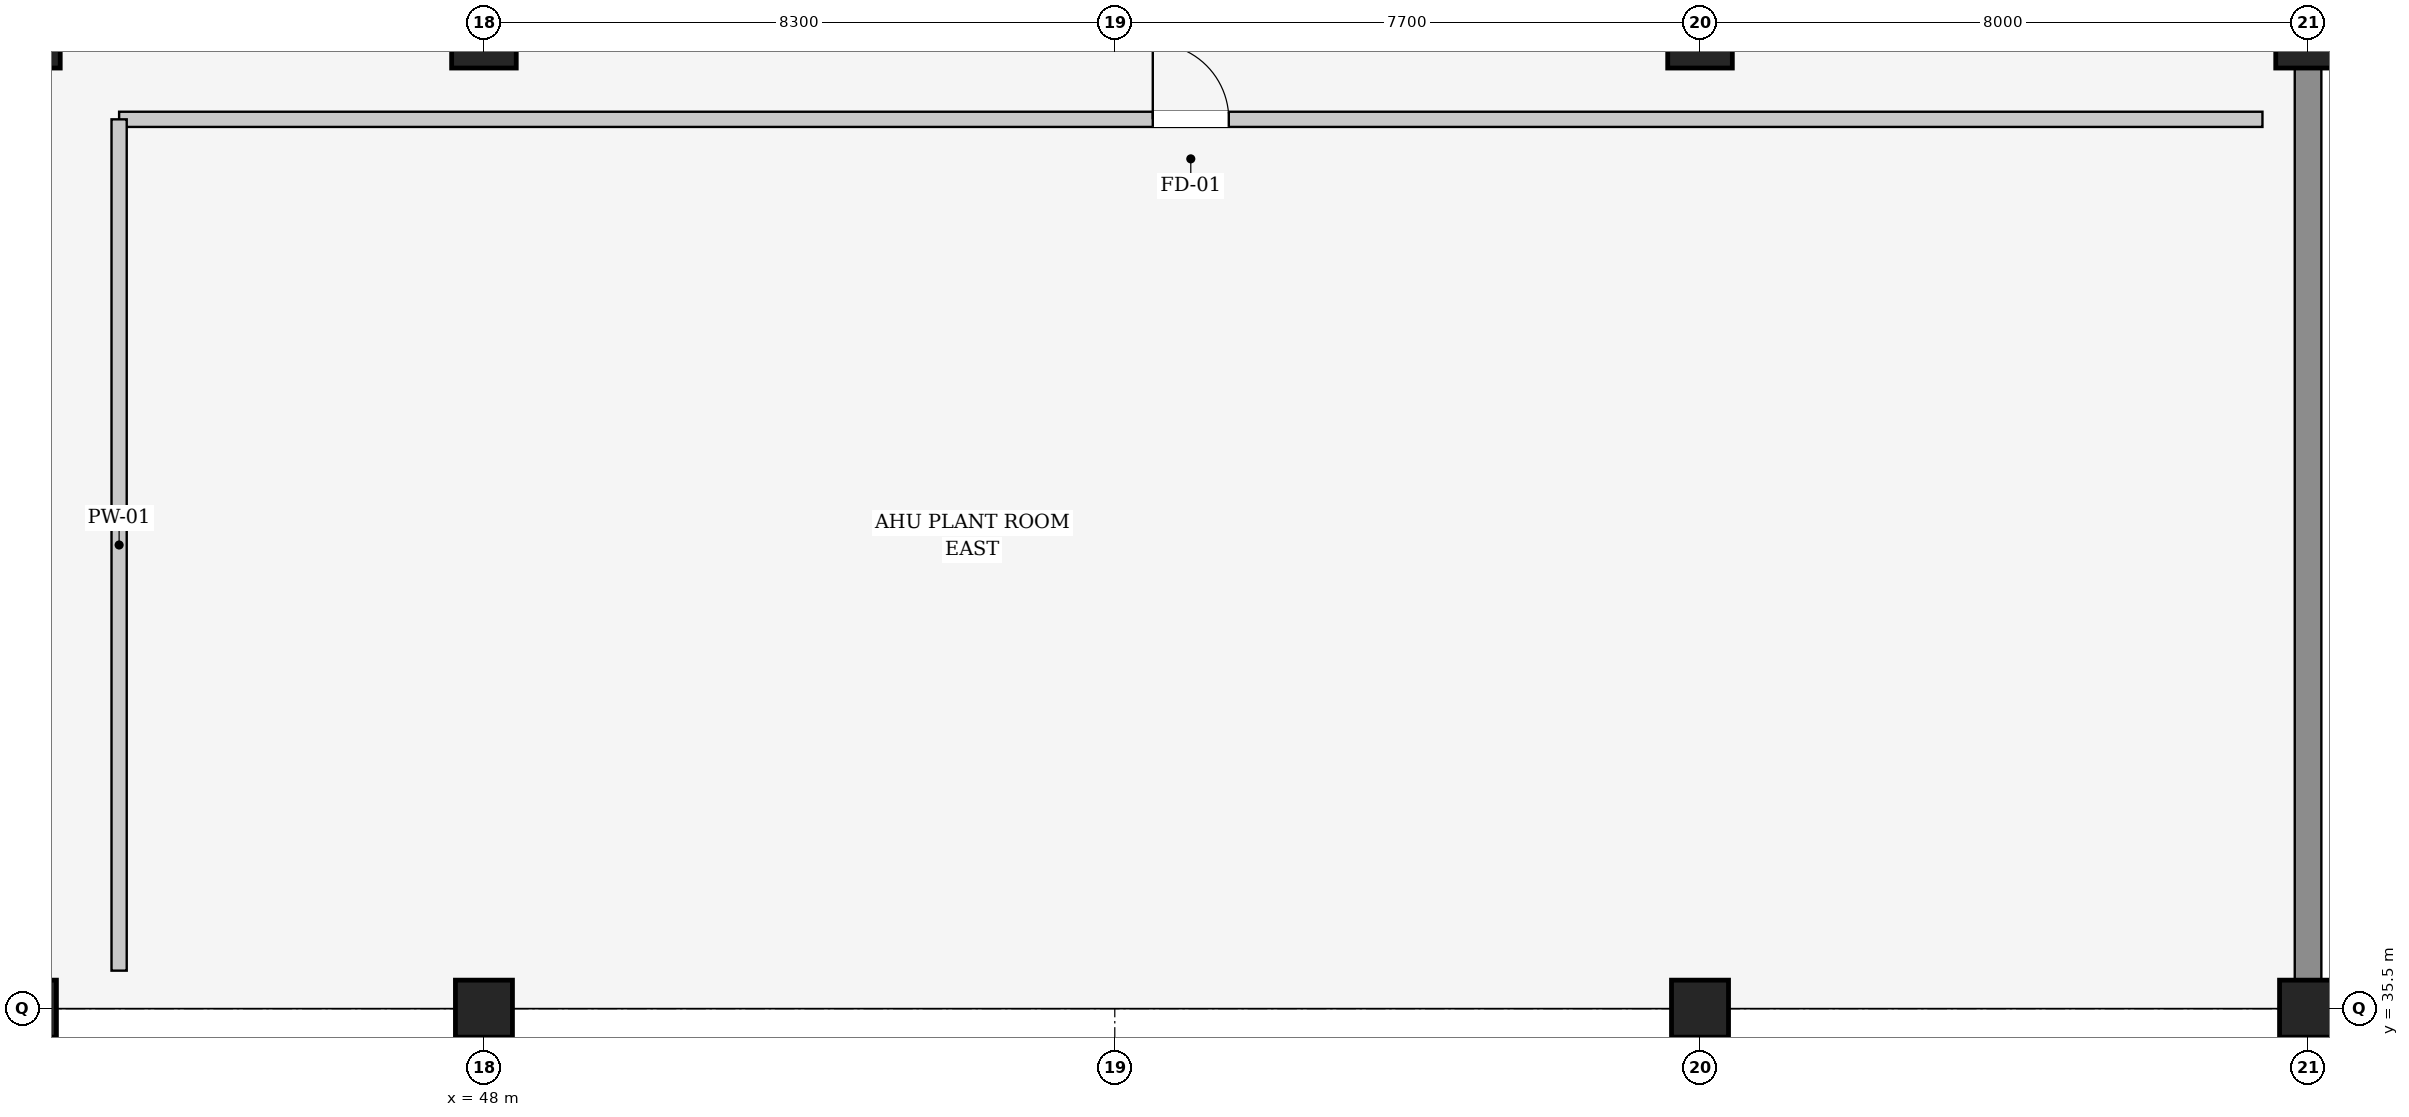
"""IFC4 building model, lengths in metres.
Left out: names, types, materials, properties, quantities, classifications, styles, units other than length and angle.
Written with IfcOpenShell. Run it as: python <this file> out.ifc"""

import sys

from ifc_helpers import new_model, si_unit, direction, frame, frame_2d, origin, origin_2d, place, context, subcontext, project, spatial, rectangle, extrude, element, fill, save


model = new_model("IFC4")
c1 = context("Model", 3, precision=1e-05, world=origin(), true_north=direction((0.0, 1.0)))
c2 = subcontext(c1, "Body", "Model", "MODEL_VIEW")
j1 = project(units=[si_unit("LENGTHUNIT", "METRE"), si_unit("PLANEANGLEUNIT", "RADIAN")], contexts=[c1])
p1 = place(None, origin())
s1 = spatial("IfcSite", under=j1, at=p1, CompositionType="ELEMENT")
p2 = place(p1, origin())
s2 = spatial("IfcBuilding", under=s1, at=p2, CompositionType="ELEMENT")
p3 = place(p2, frame((0.0, 0.0, 6.0)))
s3 = spatial("IfcBuildingStorey", under=s2, at=p3, CompositionType="ELEMENT", Elevation=6.0)
p4 = place(p3, frame((42.0, 35.5, 0.0), z_axis=(0.0, 0.0, 1.0), x_axis=(1.0, 0.0, 0.0)))
e1 = element("IfcColumn", 1, at=p4, inside=s3, PredefinedType="COLUMN", context=c2, shape_type="SweptSolid", body=[
    extrude(rectangle(XDim=0.75, YDim=0.75, at=origin_2d()), origin(), (0.0, 0.0, 1.0), 5.4),
])
p5 = place(p3, frame((42.0, 48.3, 0.0), z_axis=(0.0, 0.0, 1.0), x_axis=(1.0, 0.0, 0.0)))
e2 = element("IfcColumn", 2, at=p5, inside=s3, PredefinedType="COLUMN", context=c2, shape_type="SweptSolid", body=[
    extrude(rectangle(XDim=0.85, YDim=0.85, at=origin_2d()), origin(), (0.0, 0.0, 1.0), 5.4),
])
p6 = place(p3, frame((48.0, 35.5, 0.0), z_axis=(0.0, 0.0, 1.0), x_axis=(1.0, 0.0, 0.0)))
e3 = element("IfcColumn", 3, at=p6, inside=s3, PredefinedType="COLUMN", context=c2, shape_type="SweptSolid", body=[
    extrude(rectangle(XDim=0.75, YDim=0.75, at=origin_2d()), origin(), (0.0, 0.0, 1.0), 5.4),
])
p7 = place(p3, frame((48.0, 48.3, 0.0), z_axis=(0.0, 0.0, 1.0), x_axis=(1.0, 0.0, 0.0)))
e4 = element("IfcColumn", 4, at=p7, inside=s3, PredefinedType="COLUMN", context=c2, shape_type="SweptSolid", body=[
    extrude(rectangle(XDim=0.85, YDim=0.85, at=origin_2d()), origin(), (0.0, 0.0, 1.0), 5.4),
])
p8 = place(p3, frame((64.0, 35.5, 0.0), z_axis=(0.0, 0.0, 1.0), x_axis=(1.0, 0.0, 0.0)))
e5 = element("IfcColumn", 5, at=p8, inside=s3, PredefinedType="COLUMN", context=c2, shape_type="SweptSolid", body=[
    extrude(rectangle(XDim=0.75, YDim=0.75, at=origin_2d()), origin(), (0.0, 0.0, 1.0), 5.4),
])
p9 = place(p3, frame((64.0, 48.3, 0.0), z_axis=(0.0, 0.0, 1.0), x_axis=(1.0, 0.0, 0.0)))
e6 = element("IfcColumn", 6, at=p9, inside=s3, PredefinedType="COLUMN", context=c2, shape_type="SweptSolid", body=[
    extrude(rectangle(XDim=0.85, YDim=0.85, at=origin_2d()), origin(), (0.0, 0.0, 1.0), 5.4),
])
p10 = place(p3, frame((72.0, 35.5, 0.0), z_axis=(0.0, 0.0, 1.0), x_axis=(1.0, 0.0, 0.0)))
e7 = element("IfcColumn", 7, at=p10, inside=s3, PredefinedType="COLUMN", context=c2, shape_type="SweptSolid", body=[
    extrude(rectangle(XDim=0.75, YDim=0.75, at=origin_2d()), origin(), (0.0, 0.0, 1.0), 5.4),
])
p11 = place(p3, frame((72.0, 48.3, 0.0), z_axis=(0.0, 0.0, 1.0), x_axis=(1.0, 0.0, 0.0)))
e8 = element("IfcColumn", 8, at=p11, inside=s3, PredefinedType="COLUMN", context=c2, shape_type="SweptSolid", body=[
    extrude(rectangle(XDim=0.85, YDim=0.85, at=origin_2d()), origin(), (0.0, 0.0, 1.0), 5.4),
])
p12 = place(p3, frame((34.325, 36.127, 0.0), z_axis=(0.0, 0.0, 1.0), x_axis=(0.760681761173, -0.649124994296, 0.0)))
e9 = element("IfcWall", 9, at=p12, inside=s3, PredefinedType="SOLIDWALL", context=c2, shape_type="SweptSolid", body=[
    extrude(rectangle(XDim=10.531, YDim=0.32, at=frame_2d((5.266, 0.0))), origin(), (0.0, 0.0, 1.0), 4.653),
])
p13 = place(p3, frame((72.0, 47.893, 0.0), z_axis=(0.0, 0.0, 1.0), x_axis=(0.0, -1.0, 0.0)))
e10 = element("IfcWall", 10, at=p13, inside=s3, PredefinedType="SOLIDWALL", context=c2, shape_type="SweptSolid", body=[
    extrude(rectangle(XDim=12.036, YDim=0.35, at=frame_2d((6.018, 0.0))), origin(), (0.0, 0.0, 1.0), 4.32),
])
p14 = place(p3, frame((43.2, 47.2, 0.0), z_axis=(0.0, 0.0, 1.0), x_axis=(1.0, 0.0, 0.0)))
e11 = element("IfcWall", 11, at=p14, inside=s3, PredefinedType="PARTITIONING", context=c2, shape_type="SweptSolid", body=[
    extrude(rectangle(XDim=28.2, YDim=0.2, at=frame_2d((14.1, 0.0))), origin(), (0.0, 0.0, 1.0), 4.522),
])
p15 = place(p14, frame((13.6, 0.0, 0.0)))
e12 = element("IfcOpeningElement", 12, at=p15, cuts=e11, PredefinedType="OPENING", context=c2, shape_type="SweptSolid", body=[
    extrude(rectangle(XDim=1.0, YDim=2.15, at=frame_2d((0.5, 1.075))), frame((0.0, 0.11, 0.0), z_axis=(0.0, -1.0, 0.0), x_axis=(1.0, 0.0, 0.0)), (0.0, 0.0, 1.0), 0.22),
])
p16 = place(p3, frame((43.2, 36.0, 0.0), z_axis=(0.0, 0.0, 1.0), x_axis=(0.0, 1.0, 0.0)))
e13 = element("IfcWall", 13, at=p16, inside=s3, PredefinedType="PARTITIONING", context=c2, shape_type="SweptSolid", body=[
    extrude(rectangle(XDim=11.2, YDim=0.2, at=frame_2d((5.6, 0.0))), origin(), (0.0, 0.0, 1.0), 4.305),
])
p17 = place(p15, origin())
e14 = element("IfcDoor", 14, at=p17, inside=s3, OperationType="SINGLE_SWING_LEFT", PredefinedType="DOOR", context=c2, shape_type="SweptSolid", body=[
    extrude(rectangle(XDim=1.0, YDim=2.15, at=frame_2d((0.5, 1.075))), frame((0.0, 0.025, 0.0), z_axis=(0.0, -1.0, 0.0), x_axis=(1.0, 0.0, 0.0)), (0.0, 0.0, 1.0), 0.05),
])
fill(e12, e14)
save(model, sys.argv[1])
